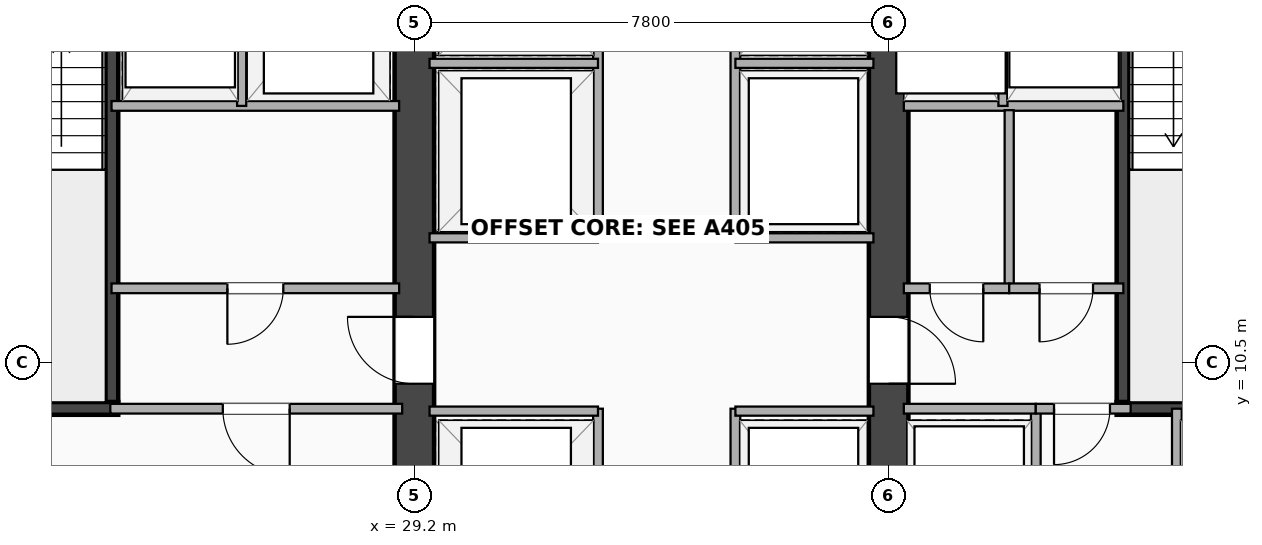
"""IFC4 building model, lengths in metres.
Left out: names, types, materials, properties, quantities, classifications, styles, units other than length and angle.
Written with IfcOpenShell. Run it as: python <this file> out.ifc"""

import sys

from ifc_helpers import new_model, si_unit, direction, frame, frame_2d, origin, place, context, subcontext, project, spatial, rectangle, extrude, element, fill, save


model = new_model("IFC4")
c1 = context("Model", 3, precision=1e-05, world=origin(), true_north=direction((0.0, 1.0)))
c2 = subcontext(c1, "Body", "Model", "MODEL_VIEW")
j1 = project(units=[si_unit("LENGTHUNIT", "METRE"), si_unit("PLANEANGLEUNIT", "RADIAN")], contexts=[c1])
p1 = place(None, origin())
s1 = spatial("IfcSite", under=j1, at=p1, CompositionType="ELEMENT")
p2 = place(p1, origin())
s2 = spatial("IfcBuilding", under=s1, at=p2, CompositionType="ELEMENT")
p3 = place(p2, frame((0.0, 0.0, 64.9)))
s3 = spatial("IfcBuildingStorey", under=s2, at=p3, CompositionType="ELEMENT", Elevation=64.9)
p4 = place(p3, frame((29.2, 3.5, 0.0), z_axis=(0.0, 0.0, 1.0), x_axis=(0.0, 1.0, 0.0)))
e1 = element("IfcWall", 1, at=p4, inside=s3, PredefinedType="SHEAR", context=c2, shape_type="SweptSolid", body=[
    extrude(rectangle(XDim=16.9, YDim=0.65, at=frame_2d((8.45, 0.0))), origin(), (0.0, 0.0, 1.0), 3.22),
])
p5 = place(p4, frame((7.75, 0.0, 0.0), z_axis=(0.0, 0.0, 1.0), x_axis=(-1.0, 0.0, 0.0)))
e2 = element("IfcOpeningElement", 2, at=p5, cuts=e1, PredefinedType="OPENING", context=c2, shape_type="SweptSolid", body=[
    extrude(rectangle(XDim=1.1, YDim=2.15, at=frame_2d((0.55, 1.075))), frame((0.0, 0.335, 0.0), z_axis=(0.0, -1.0, 0.0), x_axis=(1.0, 0.0, 0.0)), (0.0, 0.0, 1.0), 0.67),
])
p6 = place(p3, frame((37.0, 3.5, 0.0), z_axis=(0.0, 0.0, 1.0), x_axis=(0.0, 1.0, 0.0)))
e3 = element("IfcWall", 3, at=p6, inside=s3, PredefinedType="SHEAR", context=c2, shape_type="SweptSolid", body=[
    extrude(rectangle(XDim=16.9, YDim=0.65, at=frame_2d((8.45, 0.0))), origin(), (0.0, 0.0, 1.0), 3.22),
])
p7 = place(p6, frame((6.65, 0.0, 0.0)))
e4 = element("IfcOpeningElement", 4, at=p7, cuts=e3, PredefinedType="OPENING", context=c2, shape_type="SweptSolid", body=[
    extrude(rectangle(XDim=1.1, YDim=2.15, at=frame_2d((0.55, 1.075))), frame((0.0, 0.335, 0.0), z_axis=(0.0, -1.0, 0.0), x_axis=(1.0, 0.0, 0.0)), (0.0, 0.0, 1.0), 0.67),
])
p8 = place(p3, frame((24.225, 9.745, 0.0), z_axis=(0.0, 0.0, 1.0), x_axis=(0.0, 1.0, 0.0)))
e5 = element("IfcWall", 5, at=p8, inside=s3, PredefinedType="SHEAR", context=c2, shape_type="SweptSolid", body=[
    extrude(rectangle(XDim=8.01, YDim=0.21, at=frame_2d((4.005, 0.0))), origin(), (0.0, 0.0, 1.0), 3.22),
])
p9 = place(p3, frame((20.67, 9.745, 0.0), z_axis=(0.0, 0.0, 1.0), x_axis=(1.0, 0.0, 0.0)))
e6 = element("IfcWall", 6, at=p9, inside=s3, PredefinedType="SHEAR", context=c2, shape_type="SweptSolid", body=[
    extrude(rectangle(XDim=3.66, YDim=0.21, at=frame_2d((1.83, 0.0))), origin(), (0.0, 0.0, 1.0), 3.22),
])
p10 = place(p3, frame((40.855, 9.745, 0.0), z_axis=(0.0, 0.0, 1.0), x_axis=(0.0, 1.0, 0.0)))
e7 = element("IfcWall", 7, at=p10, inside=s3, PredefinedType="SHEAR", context=c2, shape_type="SweptSolid", body=[
    extrude(rectangle(XDim=8.01, YDim=0.21, at=frame_2d((4.005, 0.0))), origin(), (0.0, 0.0, 1.0), 3.22),
])
p11 = place(p3, frame((40.75, 9.745, 0.0), z_axis=(0.0, 0.0, 1.0), x_axis=(1.0, 0.0, 0.0)))
e8 = element("IfcWall", 8, at=p11, inside=s3, PredefinedType="SHEAR", context=c2, shape_type="SweptSolid", body=[
    extrude(rectangle(XDim=3.66, YDim=0.21, at=frame_2d((1.83, 0.0))), origin(), (0.0, 0.0, 1.0), 3.22),
])
p12 = place(p3, frame((24.22, 14.72, 0.0), z_axis=(0.0, 0.0, 1.0), x_axis=(1.0, 0.0, 0.0)))
e9 = element("IfcWall", 9, at=p12, inside=s3, PredefinedType="PARTITIONING", context=c2, shape_type="SweptSolid", body=[
    extrude(rectangle(XDim=4.73, YDim=0.16, at=frame_2d((2.365, 0.0))), origin(), (0.0, 0.0, 1.0), 3.22),
])
p13 = place(p3, frame((26.36, 14.72, 0.0), z_axis=(0.0, 0.0, 1.0), x_axis=(0.0, 1.0, 0.0)))
e10 = element("IfcWall", 10, at=p13, inside=s3, PredefinedType="PARTITIONING", context=c2, shape_type="SweptSolid", body=[
    extrude(rectangle(XDim=3.04, YDim=0.15, at=frame_2d((1.52, 0.0))), origin(), (0.0, 0.0, 1.0), 3.22),
])
p14 = place(p3, frame((37.25, 14.72, 0.0), z_axis=(0.0, 0.0, 1.0), x_axis=(1.0, 0.0, 0.0)))
e11 = element("IfcWall", 11, at=p14, inside=s3, PredefinedType="PARTITIONING", context=c2, shape_type="SweptSolid", body=[
    extrude(rectangle(XDim=3.61, YDim=0.16, at=frame_2d((1.805, 0.0))), origin(), (0.0, 0.0, 1.0), 3.22),
])
p15 = place(p3, frame((38.88, 14.72, 0.0), z_axis=(0.0, 0.0, 1.0), x_axis=(0.0, 1.0, 0.0)))
e12 = element("IfcWall", 12, at=p15, inside=s3, PredefinedType="PARTITIONING", context=c2, shape_type="SweptSolid", body=[
    extrude(rectangle(XDim=3.04, YDim=0.15, at=frame_2d((1.52, 0.0))), origin(), (0.0, 0.0, 1.0), 3.22),
])
p16 = place(p3, frame((24.22, 11.72, 0.0), z_axis=(0.0, 0.0, 1.0), x_axis=(1.0, 0.0, 0.0)))
e13 = element("IfcWall", 13, at=p16, inside=s3, PredefinedType="PARTITIONING", context=c2, shape_type="SweptSolid", body=[
    extrude(rectangle(XDim=4.73, YDim=0.16, at=frame_2d((2.365, 0.0))), origin(), (0.0, 0.0, 1.0), 3.22),
])
p17 = place(p16, frame((1.905, 0.0, 0.0)))
e14 = element("IfcOpeningElement", 14, at=p17, cuts=e13, PredefinedType="OPENING", context=c2, shape_type="SweptSolid", body=[
    extrude(rectangle(XDim=0.92, YDim=2.08, at=frame_2d((0.46, 1.04))), frame((0.0, 0.09, 0.0), z_axis=(0.0, -1.0, 0.0), x_axis=(1.0, 0.0, 0.0)), (0.0, 0.0, 1.0), 0.18),
])
p18 = place(p3, frame((38.983, 11.72, 0.0), z_axis=(0.0, 0.0, 1.0), x_axis=(0.0, 1.0, 0.0)))
e15 = element("IfcWall", 15, at=p18, inside=s3, PredefinedType="PARTITIONING", context=c2, shape_type="SweptSolid", body=[
    extrude(rectangle(XDim=2.93, YDim=0.15, at=frame_2d((1.465, 0.0))), origin(), (0.0, 0.0, 1.0), 3.22),
])
p19 = place(p3, frame((37.25, 11.72, 0.0), z_axis=(0.0, 0.0, 1.0), x_axis=(1.0, 0.0, 0.0)))
e16 = element("IfcWall", 16, at=p19, inside=s3, PredefinedType="PARTITIONING", context=c2, shape_type="SweptSolid", body=[
    extrude(rectangle(XDim=1.733, YDim=0.16, at=frame_2d((0.866, 0.0))), origin(), (0.0, 0.0, 1.0), 3.22),
])
p20 = place(p19, frame((0.427, 0.0, 0.0)))
e17 = element("IfcOpeningElement", 17, at=p20, cuts=e16, PredefinedType="OPENING", context=c2, shape_type="SweptSolid", body=[
    extrude(rectangle(XDim=0.88, YDim=2.08, at=frame_2d((0.44, 1.04))), frame((0.0, 0.09, 0.0), z_axis=(0.0, -1.0, 0.0), x_axis=(1.0, 0.0, 0.0)), (0.0, 0.0, 1.0), 0.18),
])
p21 = place(p3, frame((38.983, 11.72, 0.0), z_axis=(0.0, 0.0, 1.0), x_axis=(1.0, 0.0, 0.0)))
e18 = element("IfcWall", 18, at=p21, inside=s3, PredefinedType="PARTITIONING", context=c2, shape_type="SweptSolid", body=[
    extrude(rectangle(XDim=1.877, YDim=0.16, at=frame_2d((0.938, 0.0))), origin(), (0.0, 0.0, 1.0), 3.22),
])
p22 = place(p21, frame((0.499, 0.0, 0.0)))
e19 = element("IfcOpeningElement", 19, at=p22, cuts=e18, PredefinedType="OPENING", context=c2, shape_type="SweptSolid", body=[
    extrude(rectangle(XDim=0.88, YDim=2.08, at=frame_2d((0.44, 1.04))), frame((0.0, 0.09, 0.0), z_axis=(0.0, -1.0, 0.0), x_axis=(1.0, 0.0, 0.0)), (0.0, 0.0, 1.0), 0.18),
])
p23 = place(p3, frame((24.2, 9.74, 0.0), z_axis=(0.0, 0.0, 1.0), x_axis=(1.0, 0.0, 0.0)))
e20 = element("IfcWall", 20, at=p23, inside=s3, PredefinedType="PARTITIONING", context=c2, shape_type="SweptSolid", body=[
    extrude(rectangle(XDim=4.8, YDim=0.16, at=frame_2d((2.4, 0.0))), origin(), (0.0, 0.0, 1.0), 3.22),
])
p24 = place(p23, frame((1.85, 0.0, 0.0)))
e21 = element("IfcOpeningElement", 21, at=p24, cuts=e20, PredefinedType="OPENING", context=c2, shape_type="SweptSolid", body=[
    extrude(rectangle(XDim=1.1, YDim=2.15, at=frame_2d((0.55, 1.075))), frame((0.0, 0.09, 0.0), z_axis=(0.0, -1.0, 0.0), x_axis=(1.0, 0.0, 0.0)), (0.0, 0.0, 1.0), 0.18),
])
for number, where, z_axis, x_axis in (
    (22, (39.42, 3.9, 0.0), (0.0, 0.0, 1.0), (0.0, 1.0, 0.0)),
    (23, (41.74, 3.9, 0.0), (0.0, 0.0, 1.0), (0.0, 1.0, 0.0)),
):
    element("IfcWall", number, at=place(p3, frame(where, z_axis=z_axis, x_axis=x_axis)), inside=s3, PredefinedType="PARTITIONING", context=c2, shape_type="SweptSolid", body=[
        extrude(rectangle(XDim=5.84, YDim=0.16, at=frame_2d((2.92, 0.0))), origin(), (0.0, 0.0, 1.0), 3.22),
    ])
p25 = place(p3, frame((37.25, 9.74, 0.0), z_axis=(0.0, 0.0, 1.0), x_axis=(1.0, 0.0, 0.0)))
e24 = element("IfcWall", 24, at=p25, inside=s3, PredefinedType="PARTITIONING", context=c2, shape_type="SweptSolid", body=[
    extrude(rectangle(XDim=2.17, YDim=0.16, at=frame_2d((1.085, 0.0))), origin(), (0.0, 0.0, 1.0), 3.22),
])
p26 = place(p3, frame((39.42, 9.74, 0.0), z_axis=(0.0, 0.0, 1.0), x_axis=(1.0, 0.0, 0.0)))
e25 = element("IfcWall", 25, at=p26, inside=s3, PredefinedType="PARTITIONING", context=c2, shape_type="SweptSolid", body=[
    extrude(rectangle(XDim=1.56, YDim=0.16, at=frame_2d((0.78, 0.0))), origin(), (0.0, 0.0, 1.0), 3.22),
])
p27 = place(p26, frame((0.3, 0.0, 0.0)))
e26 = element("IfcOpeningElement", 26, at=p27, cuts=e25, PredefinedType="OPENING", context=c2, shape_type="SweptSolid", body=[
    extrude(rectangle(XDim=0.92, YDim=2.08, at=frame_2d((0.46, 1.04))), frame((0.0, 0.09, 0.0), z_axis=(0.0, -1.0, 0.0), x_axis=(1.0, 0.0, 0.0)), (0.0, 0.0, 1.0), 0.18),
])
p28 = place(p3, frame((32.22, 3.9, 0.0), z_axis=(0.0, 0.0, 1.0), x_axis=(0.0, 1.0, 0.0)))
e27 = element("IfcWall", 27, at=p28, inside=s3, PredefinedType="PARTITIONING", context=c2, shape_type="SweptSolid", body=[
    extrude(rectangle(XDim=5.84, YDim=0.16, at=frame_2d((2.92, 0.0))), origin(), (0.0, 0.0, 1.0), 3.22),
])
p29 = place(p28, frame((1.78, 0.0, 0.0), z_axis=(0.0, 0.0, 1.0), x_axis=(-1.0, 0.0, 0.0)))
e28 = element("IfcOpeningElement", 28, at=p29, cuts=e27, PredefinedType="OPENING", context=c2, shape_type="SweptSolid", body=[
    extrude(rectangle(XDim=1.08, YDim=2.16, at=frame_2d((0.54, 1.08))), frame((0.0, 0.09, 0.0), z_axis=(0.0, -1.0, 0.0), x_axis=(1.0, 0.0, 0.0)), (0.0, 0.0, 1.0), 0.18),
])
p30 = place(p28, frame((4.68, 0.0, 0.0), z_axis=(0.0, 0.0, 1.0), x_axis=(-1.0, 0.0, 0.0)))
e29 = element("IfcOpeningElement", 29, at=p30, cuts=e27, PredefinedType="OPENING", context=c2, shape_type="SweptSolid", body=[
    extrude(rectangle(XDim=1.08, YDim=2.16, at=frame_2d((0.54, 1.08))), frame((0.0, 0.09, 0.0), z_axis=(0.0, -1.0, 0.0), x_axis=(1.0, 0.0, 0.0)), (0.0, 0.0, 1.0), 0.18),
])
p31 = place(p3, frame((34.48, 3.9, 0.0), z_axis=(0.0, 0.0, 1.0), x_axis=(0.0, 1.0, 0.0)))
e30 = element("IfcWall", 30, at=p31, inside=s3, PredefinedType="PARTITIONING", context=c2, shape_type="SweptSolid", body=[
    extrude(rectangle(XDim=5.84, YDim=0.16, at=frame_2d((2.92, 0.0))), origin(), (0.0, 0.0, 1.0), 3.22),
])
p32 = place(p31, frame((0.7, 0.0, 0.0)))
e31 = element("IfcOpeningElement", 31, at=p32, cuts=e30, PredefinedType="OPENING", context=c2, shape_type="SweptSolid", body=[
    extrude(rectangle(XDim=1.08, YDim=2.16, at=frame_2d((0.54, 1.08))), frame((0.0, 0.09, 0.0), z_axis=(0.0, -1.0, 0.0), x_axis=(1.0, 0.0, 0.0)), (0.0, 0.0, 1.0), 0.18),
])
p33 = place(p31, frame((3.6, 0.0, 0.0)))
e32 = element("IfcOpeningElement", 32, at=p33, cuts=e30, PredefinedType="OPENING", context=c2, shape_type="SweptSolid", body=[
    extrude(rectangle(XDim=1.08, YDim=2.16, at=frame_2d((0.54, 1.08))), frame((0.0, 0.09, 0.0), z_axis=(0.0, -1.0, 0.0), x_axis=(1.0, 0.0, 0.0)), (0.0, 0.0, 1.0), 0.18),
])
p34 = place(p3, frame((29.45, 9.7, 0.0), z_axis=(0.0, 0.0, 1.0), x_axis=(1.0, 0.0, 0.0)))
e33 = element("IfcWall", 33, at=p34, inside=s3, PredefinedType="PARTITIONING", context=c2, shape_type="SweptSolid", body=[
    extrude(rectangle(XDim=2.77, YDim=0.15, at=frame_2d((1.385, 0.0))), origin(), (0.0, 0.0, 1.0), 3.22),
])
p35 = place(p3, frame((34.48, 9.7, 0.0), z_axis=(0.0, 0.0, 1.0), x_axis=(1.0, 0.0, 0.0)))
e34 = element("IfcWall", 34, at=p35, inside=s3, PredefinedType="PARTITIONING", context=c2, shape_type="SweptSolid", body=[
    extrude(rectangle(XDim=2.27, YDim=0.15, at=frame_2d((1.135, 0.0))), origin(), (0.0, 0.0, 1.0), 3.22),
])
p36 = place(p3, frame((32.22, 12.5, 0.0), z_axis=(0.0, 0.0, 1.0), x_axis=(0.0, 1.0, 0.0)))
e35 = element("IfcWall", 35, at=p36, inside=s3, PredefinedType="PARTITIONING", context=c2, shape_type="SweptSolid", body=[
    extrude(rectangle(XDim=7.92, YDim=0.16, at=frame_2d((3.96, 0.0))), origin(), (0.0, 0.0, 1.0), 2.51),
])
p37 = place(p36, frame((6.1, 0.0, 0.0)))
e36 = element("IfcOpeningElement", 36, at=p37, cuts=e35, PredefinedType="OPENING", context=c2, shape_type="SweptSolid", body=[
    extrude(rectangle(XDim=0.88, YDim=2.08, at=frame_2d((0.44, 1.04))), frame((0.0, 0.09, 0.0), z_axis=(0.0, -1.0, 0.0), x_axis=(1.0, 0.0, 0.0)), (0.0, 0.0, 1.0), 0.18),
])
p38 = place(p3, frame((34.48, 12.5, 0.0), z_axis=(0.0, 0.0, 1.0), x_axis=(0.0, 1.0, 0.0)))
e37 = element("IfcWall", 37, at=p38, inside=s3, PredefinedType="PARTITIONING", context=c2, shape_type="SweptSolid", body=[
    extrude(rectangle(XDim=7.92, YDim=0.16, at=frame_2d((3.96, 0.0))), origin(), (0.0, 0.0, 1.0), 2.51),
])
p39 = place(p38, frame((6.98, 0.0, 0.0), z_axis=(0.0, 0.0, 1.0), x_axis=(-1.0, 0.0, 0.0)))
e38 = element("IfcOpeningElement", 38, at=p39, cuts=e37, PredefinedType="OPENING", context=c2, shape_type="SweptSolid", body=[
    extrude(rectangle(XDim=0.88, YDim=2.08, at=frame_2d((0.44, 1.04))), frame((0.0, 0.09, 0.0), z_axis=(0.0, -1.0, 0.0), x_axis=(1.0, 0.0, 0.0)), (0.0, 0.0, 1.0), 0.18),
])
p40 = place(p3, frame((29.45, 12.55, 0.0), z_axis=(0.0, 0.0, 1.0), x_axis=(1.0, 0.0, 0.0)))
e39 = element("IfcWall", 39, at=p40, inside=s3, PredefinedType="PARTITIONING", context=c2, shape_type="SweptSolid", body=[
    extrude(rectangle(XDim=2.77, YDim=0.15, at=frame_2d((1.385, 0.0))), origin(), (0.0, 0.0, 1.0), 3.22),
])
p41 = place(p3, frame((34.48, 12.55, 0.0), z_axis=(0.0, 0.0, 1.0), x_axis=(1.0, 0.0, 0.0)))
e40 = element("IfcWall", 40, at=p41, inside=s3, PredefinedType="PARTITIONING", context=c2, shape_type="SweptSolid", body=[
    extrude(rectangle(XDim=2.27, YDim=0.15, at=frame_2d((1.135, 0.0))), origin(), (0.0, 0.0, 1.0), 3.22),
])
p42 = place(p3, frame((29.45, 15.42, 0.0), z_axis=(0.0, 0.0, 1.0), x_axis=(1.0, 0.0, 0.0)))
e41 = element("IfcWall", 41, at=p42, inside=s3, PredefinedType="PARTITIONING", context=c2, shape_type="SweptSolid", body=[
    extrude(rectangle(XDim=2.77, YDim=0.15, at=frame_2d((1.385, 0.0))), origin(), (0.0, 0.0, 1.0), 3.22),
])
p43 = place(p3, frame((34.48, 15.42, 0.0), z_axis=(0.0, 0.0, 1.0), x_axis=(1.0, 0.0, 0.0)))
e42 = element("IfcWall", 42, at=p43, inside=s3, PredefinedType="PARTITIONING", context=c2, shape_type="SweptSolid", body=[
    extrude(rectangle(XDim=2.27, YDim=0.15, at=frame_2d((1.135, 0.0))), origin(), (0.0, 0.0, 1.0), 3.22),
])
p44 = place(p5, origin())
e43 = element("IfcDoor", 43, at=p44, inside=s3, OperationType="SINGLE_SWING_RIGHT", PredefinedType="DOOR", context=c2, shape_type="SweptSolid", body=[
    extrude(rectangle(XDim=1.1, YDim=2.15, at=frame_2d((0.55, 1.075))), frame((0.0, 0.025, 0.0), z_axis=(0.0, -1.0, 0.0), x_axis=(1.0, 0.0, 0.0)), (0.0, 0.0, 1.0), 0.05),
])
fill(e2, e43)
p45 = place(p7, origin())
e44 = element("IfcDoor", 44, at=p45, inside=s3, OperationType="SINGLE_SWING_LEFT", PredefinedType="DOOR", context=c2, shape_type="SweptSolid", body=[
    extrude(rectangle(XDim=1.1, YDim=2.15, at=frame_2d((0.55, 1.075))), frame((0.0, 0.025, 0.0), z_axis=(0.0, -1.0, 0.0), x_axis=(1.0, 0.0, 0.0)), (0.0, 0.0, 1.0), 0.05),
])
fill(e4, e44)
p46 = place(p17, origin())
e45 = element("IfcDoor", 45, at=p46, inside=s3, OperationType="SINGLE_SWING_LEFT", PredefinedType="DOOR", context=c2, shape_type="SweptSolid", body=[
    extrude(rectangle(XDim=0.92, YDim=2.08, at=frame_2d((0.46, 1.04))), frame((0.0, 0.025, 0.0), z_axis=(0.0, -1.0, 0.0), x_axis=(1.0, 0.0, 0.0)), (0.0, 0.0, 1.0), 0.05),
])
fill(e14, e45)
p47 = place(p20, origin())
e46 = element("IfcDoor", 46, at=p47, inside=s3, OperationType="SINGLE_SWING_RIGHT", PredefinedType="DOOR", context=c2, shape_type="SweptSolid", body=[
    extrude(rectangle(XDim=0.88, YDim=2.08, at=frame_2d((0.44, 1.04))), frame((0.0, 0.025, 0.0), z_axis=(0.0, -1.0, 0.0), x_axis=(1.0, 0.0, 0.0)), (0.0, 0.0, 1.0), 0.05),
])
fill(e17, e46)
p48 = place(p22, origin())
e47 = element("IfcDoor", 47, at=p48, inside=s3, OperationType="SINGLE_SWING_LEFT", PredefinedType="DOOR", context=c2, shape_type="SweptSolid", body=[
    extrude(rectangle(XDim=0.88, YDim=2.08, at=frame_2d((0.44, 1.04))), frame((0.0, 0.025, 0.0), z_axis=(0.0, -1.0, 0.0), x_axis=(1.0, 0.0, 0.0)), (0.0, 0.0, 1.0), 0.05),
])
fill(e19, e47)
p49 = place(p24, origin())
e48 = element("IfcDoor", 48, at=p49, inside=s3, OperationType="SINGLE_SWING_RIGHT", PredefinedType="DOOR", context=c2, shape_type="SweptSolid", body=[
    extrude(rectangle(XDim=1.1, YDim=2.15, at=frame_2d((0.55, 1.075))), frame((0.0, 0.025, 0.0), z_axis=(0.0, -1.0, 0.0), x_axis=(1.0, 0.0, 0.0)), (0.0, 0.0, 1.0), 0.05),
])
fill(e21, e48)
p50 = place(p27, origin())
e49 = element("IfcDoor", 49, at=p50, inside=s3, OperationType="SINGLE_SWING_LEFT", PredefinedType="DOOR", context=c2, shape_type="SweptSolid", body=[
    extrude(rectangle(XDim=0.92, YDim=2.08, at=frame_2d((0.46, 1.04))), frame((0.0, 0.025, 0.0), z_axis=(0.0, -1.0, 0.0), x_axis=(1.0, 0.0, 0.0)), (0.0, 0.0, 1.0), 0.05),
])
fill(e26, e49)
save(model, sys.argv[1])
